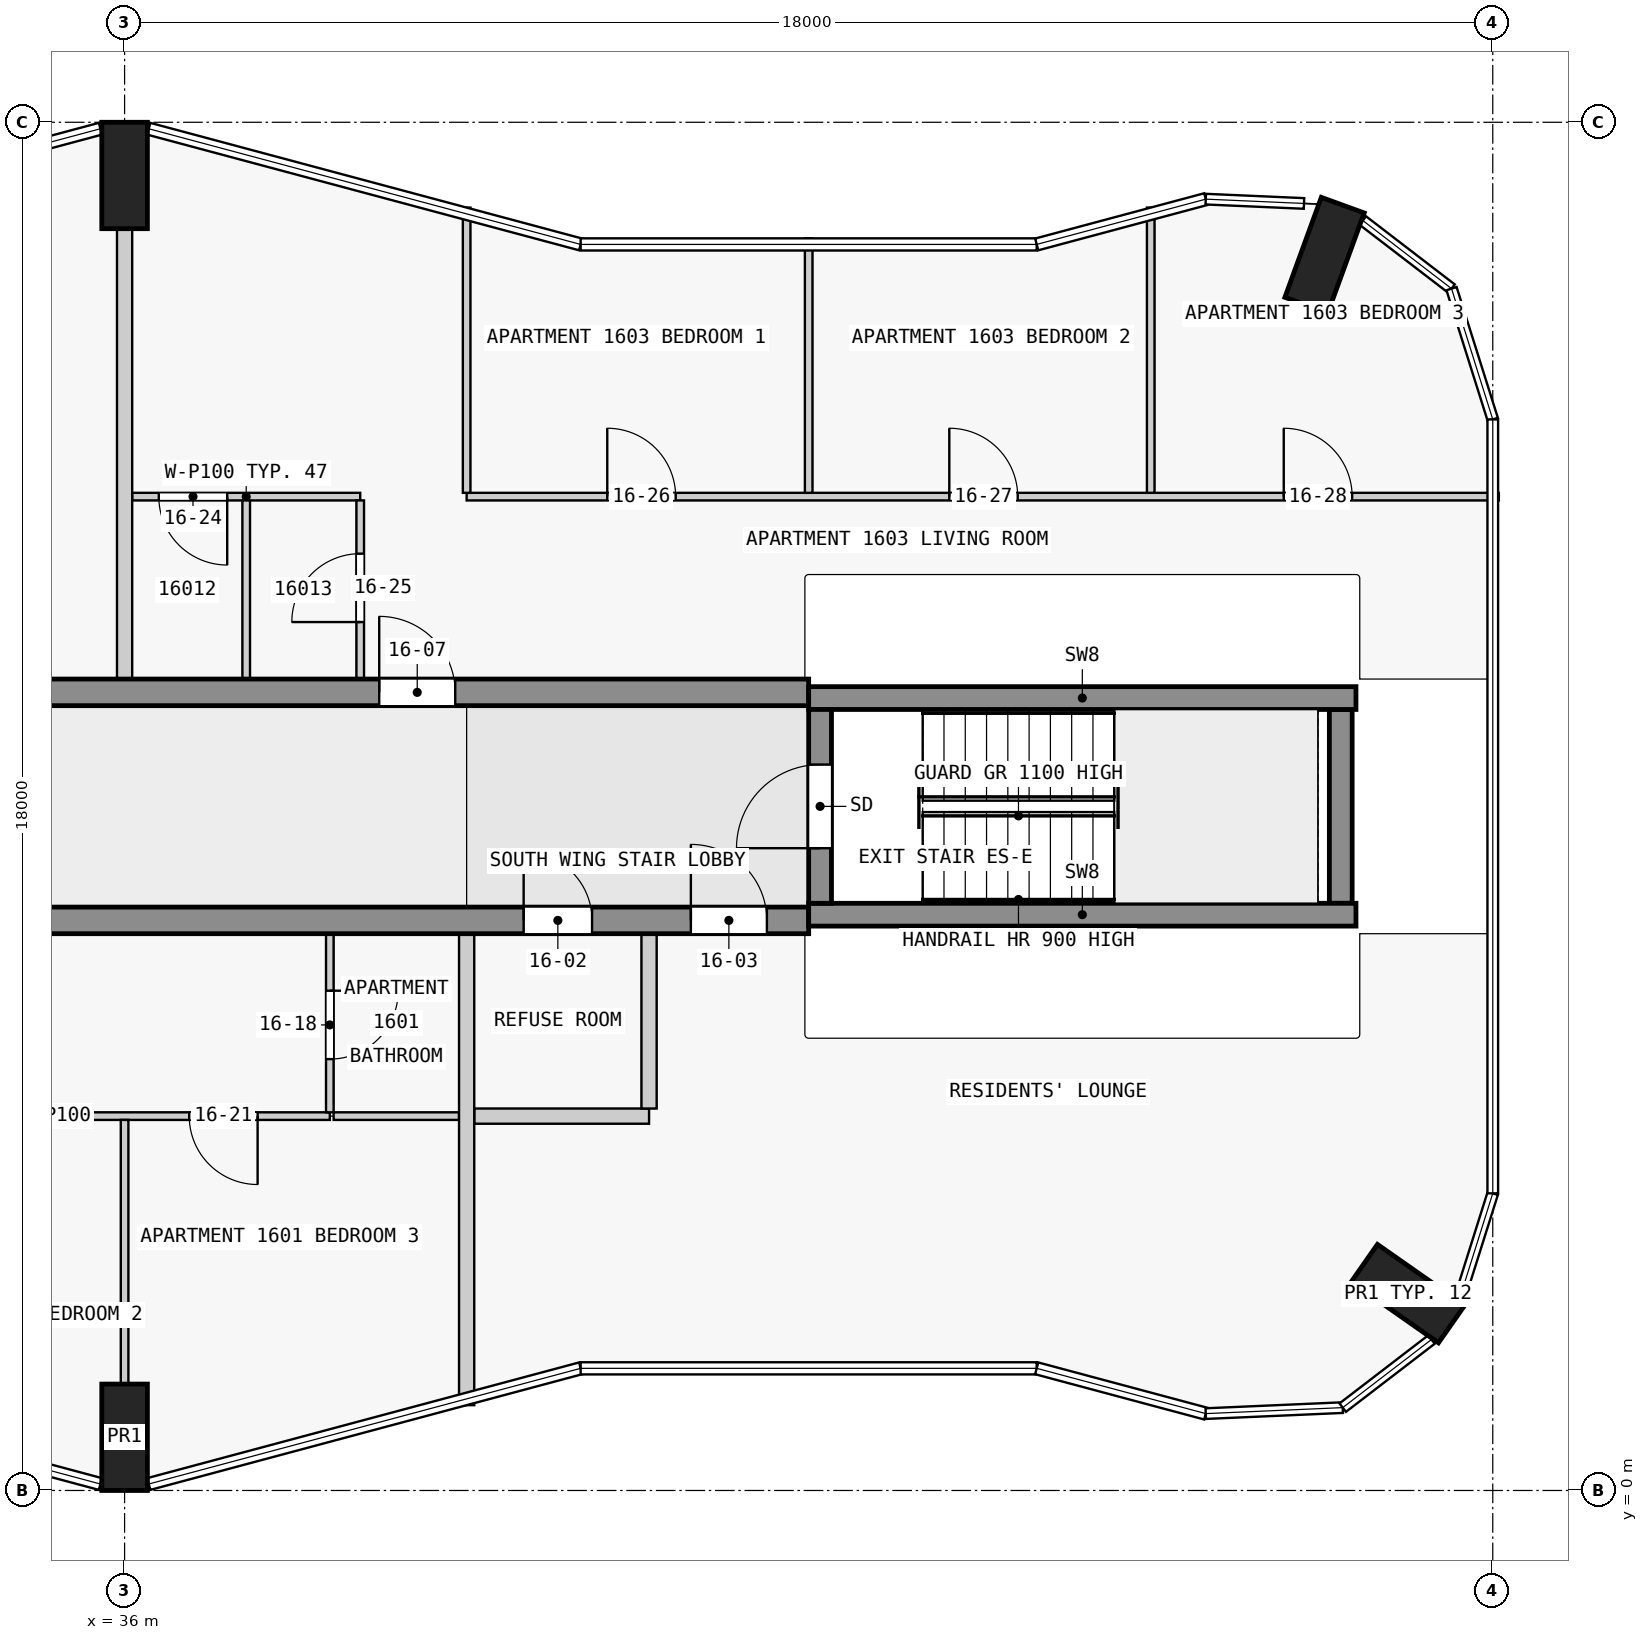
"""IFC4 building model, lengths in metres.
Left out: names, types, materials, properties, quantities, classifications, styles, units other than length and angle.
Written with IfcOpenShell. Run it as: python <this file> out.ifc"""

import sys

from ifc_helpers import new_model, si_unit, direction, frame, frame_2d, origin, origin_2d, place, context, subcontext, project, spatial, rectangle, extrude, element, fill, save


model = new_model("IFC4")
c1 = context("Model", 3, precision=1e-05, world=origin(), true_north=direction((0.0, 1.0)))
c2 = subcontext(c1, "Body", "Model", "MODEL_VIEW")
j1 = project(units=[si_unit("LENGTHUNIT", "METRE"), si_unit("PLANEANGLEUNIT", "RADIAN")], contexts=[c1])
p1 = place(None, origin())
s1 = spatial("IfcSite", under=j1, at=p1, CompositionType="ELEMENT")
p2 = place(p1, origin())
s2 = spatial("IfcBuilding", under=s1, at=p2, CompositionType="ELEMENT")
p3 = place(p2, frame((0.0, 0.0, 65.3)))
s3 = spatial("IfcBuildingStorey", under=s2, at=p3, CompositionType="ELEMENT", Elevation=65.3)
for number, where, z_axis, x_axis in (
    (1, (36.0, 0.7, 0.0), (0.0, 0.0, 1.0), (1.0, 0.0, 0.0)),
    (2, (52.884, 2.59, 0.0), (0.0, 0.0, 1.0), (0.574, 0.819, 0.0)),
    (3, (51.787, 16.252, 0.0), (0.0, 0.0, 1.0), (-0.94, 0.342, 0.0)),
    (4, (36.0, 17.3, 0.0), (0.0, 0.0, 1.0), (1.0, 0.0, 0.0)),
):
    element("IfcColumn", number, at=place(p3, frame(where, z_axis=z_axis, x_axis=x_axis)), inside=s3, PredefinedType="COLUMN", context=c2, shape_type="SweptSolid", body=[
        extrude(rectangle(XDim=0.6, YDim=1.4, at=origin_2d()), origin(), (0.0, 0.0, 1.0), 3.5),
    ])
p4 = place(p3, frame((45.15, 7.725, 0.0), z_axis=(0.0, 0.0, 1.0), x_axis=(0.0, 1.0, 0.0)))
e5 = element("IfcWall", 5, at=p4, inside=s3, PredefinedType="SHEAR", context=c2, shape_type="SweptSolid", body=[
    extrude(rectangle(XDim=2.55, YDim=0.3, at=frame_2d((1.275, 0.0))), origin(), (0.0, 0.0, 1.0), 3.5),
])
p5 = place(p4, frame((0.725, 0.0, 0.0)))
e6 = element("IfcOpeningElement", 6, at=p5, cuts=e5, PredefinedType="OPENING", context=c2, shape_type="SweptSolid", body=[
    extrude(rectangle(XDim=1.1, YDim=2.1, at=frame_2d((0.55, 1.05))), frame((0.0, 0.16, 0.0), z_axis=(0.0, -1.0, 0.0), x_axis=(1.0, 0.0, 0.0)), (0.0, 0.0, 1.0), 0.32),
])
p6 = place(p3, frame((52.0, 7.725, 0.0), z_axis=(0.0, 0.0, 1.0), x_axis=(0.0, 1.0, 0.0)))
e7 = element("IfcWall", 7, at=p6, inside=s3, PredefinedType="SHEAR", context=c2, shape_type="SweptSolid", body=[
    extrude(rectangle(XDim=2.55, YDim=0.3, at=frame_2d((1.275, 0.0))), origin(), (0.0, 0.0, 1.0), 3.5),
])
for number, where, z_axis, x_axis in (
    (8, (45.0, 7.575, 0.0), (0.0, 0.0, 1.0), (1.0, 0.0, 0.0)),
    (9, (45.0, 10.425, 0.0), (0.0, 0.0, 1.0), (1.0, 0.0, 0.0)),
):
    element("IfcWall", number, at=place(p3, frame(where, z_axis=z_axis, x_axis=x_axis)), inside=s3, PredefinedType="SHEAR", context=c2, shape_type="SweptSolid", body=[
        extrude(rectangle(XDim=7.2, YDim=0.3, at=frame_2d((3.6, 0.0))), origin(), (0.0, 0.0, 1.0), 3.5),
    ])
p7 = place(p3, frame((22.5, 7.5, 0.0), z_axis=(0.0, 0.0, 1.0), x_axis=(1.0, 0.0, 0.0)))
e10 = element("IfcWall", 10, at=p7, inside=s3, PredefinedType="SHEAR", context=c2, shape_type="SweptSolid", body=[
    extrude(rectangle(XDim=22.5, YDim=0.35, at=frame_2d((11.25, 0.0))), origin(), (0.0, 0.0, 1.0), 3.25),
])
p8 = place(p7, frame((9.55, 0.0, 0.0)))
e11 = element("IfcOpeningElement", 11, at=p8, cuts=e10, PredefinedType="OPENING", context=c2, shape_type="SweptSolid", body=[
    extrude(rectangle(XDim=1.0, YDim=2.1, at=frame_2d((0.5, 1.05))), frame((0.0, 0.185, 0.0), z_axis=(0.0, -1.0, 0.0), x_axis=(1.0, 0.0, 0.0)), (0.0, 0.0, 1.0), 0.37),
])
p9 = place(p7, frame((18.75, 0.0, 0.0)))
e12 = element("IfcOpeningElement", 12, at=p9, cuts=e10, PredefinedType="OPENING", context=c2, shape_type="SweptSolid", body=[
    extrude(rectangle(XDim=0.9, YDim=2.1, at=frame_2d((0.45, 1.05))), frame((0.0, 0.185, 0.0), z_axis=(0.0, -1.0, 0.0), x_axis=(1.0, 0.0, 0.0)), (0.0, 0.0, 1.0), 0.37),
])
p10 = place(p7, frame((20.95, 0.0, 0.0)))
e13 = element("IfcOpeningElement", 13, at=p10, cuts=e10, PredefinedType="OPENING", context=c2, shape_type="SweptSolid", body=[
    extrude(rectangle(XDim=1.0, YDim=2.1, at=frame_2d((0.5, 1.05))), frame((0.0, 0.185, 0.0), z_axis=(0.0, -1.0, 0.0), x_axis=(1.0, 0.0, 0.0)), (0.0, 0.0, 1.0), 0.37),
])
p11 = place(p3, frame((22.5, 10.5, 0.0), z_axis=(0.0, 0.0, 1.0), x_axis=(1.0, 0.0, 0.0)))
e14 = element("IfcWall", 14, at=p11, inside=s3, PredefinedType="SHEAR", context=c2, shape_type="SweptSolid", body=[
    extrude(rectangle(XDim=22.5, YDim=0.35, at=frame_2d((11.25, 0.0))), origin(), (0.0, 0.0, 1.0), 3.25),
])
p12 = place(p11, frame((1.75, 0.0, 0.0)))
e15 = element("IfcOpeningElement", 15, at=p12, cuts=e14, PredefinedType="OPENING", context=c2, shape_type="SweptSolid", body=[
    extrude(rectangle(XDim=1.0, YDim=2.1, at=frame_2d((0.5, 1.05))), frame((0.0, 0.185, 0.0), z_axis=(0.0, -1.0, 0.0), x_axis=(1.0, 0.0, 0.0)), (0.0, 0.0, 1.0), 0.37),
])
p13 = place(p11, frame((6.25, 0.0, 0.0)))
e16 = element("IfcOpeningElement", 16, at=p13, cuts=e14, PredefinedType="OPENING", context=c2, shape_type="SweptSolid", body=[
    extrude(rectangle(XDim=1.0, YDim=2.1, at=frame_2d((0.5, 1.05))), frame((0.0, 0.185, 0.0), z_axis=(0.0, -1.0, 0.0), x_axis=(1.0, 0.0, 0.0)), (0.0, 0.0, 1.0), 0.37),
])
p14 = place(p11, frame((10.75, 0.0, 0.0)))
e17 = element("IfcOpeningElement", 17, at=p14, cuts=e14, PredefinedType="OPENING", context=c2, shape_type="SweptSolid", body=[
    extrude(rectangle(XDim=1.0, YDim=2.1, at=frame_2d((0.5, 1.05))), frame((0.0, 0.185, 0.0), z_axis=(0.0, -1.0, 0.0), x_axis=(1.0, 0.0, 0.0)), (0.0, 0.0, 1.0), 0.37),
])
p15 = place(p11, frame((16.85, 0.0, 0.0)))
e18 = element("IfcOpeningElement", 18, at=p15, cuts=e14, PredefinedType="OPENING", context=c2, shape_type="SweptSolid", body=[
    extrude(rectangle(XDim=1.0, YDim=2.1, at=frame_2d((0.5, 1.05))), frame((0.0, 0.185, 0.0), z_axis=(0.0, -1.0, 0.0), x_axis=(1.0, 0.0, 0.0)), (0.0, 0.0, 1.0), 0.37),
])
p16 = place(p3, frame((38.7, 4.925, 0.0), z_axis=(0.0, 0.0, 1.0), x_axis=(-1.0, 0.0, 0.0)))
e19 = element("IfcWall", 19, at=p16, inside=s3, PredefinedType="PARTITIONING", context=c2, shape_type="SweptSolid", body=[
    extrude(rectangle(XDim=7.2, YDim=0.1, at=frame_2d((3.6, 0.0))), origin(), (0.0, 0.0, 1.0), 3.25),
])
p17 = place(p16, frame((4.45, 0.0, 0.0)))
e20 = element("IfcOpeningElement", 20, at=p17, cuts=e19, PredefinedType="OPENING", context=c2, shape_type="SweptSolid", body=[
    extrude(rectangle(XDim=0.9, YDim=2.1, at=frame_2d((0.45, 1.05))), frame((0.0, 0.06, 0.0), z_axis=(0.0, -1.0, 0.0), x_axis=(1.0, 0.0, 0.0)), (0.0, 0.0, 1.0), 0.12),
])
p18 = place(p16, frame((0.95, 0.0, 0.0)))
e21 = element("IfcOpeningElement", 21, at=p18, cuts=e19, PredefinedType="OPENING", context=c2, shape_type="SweptSolid", body=[
    extrude(rectangle(XDim=0.9, YDim=2.1, at=frame_2d((0.45, 1.05))), frame((0.0, 0.06, 0.0), z_axis=(0.0, -1.0, 0.0), x_axis=(1.0, 0.0, 0.0)), (0.0, 0.0, 1.0), 0.12),
])
p19 = place(p3, frame((38.75, 4.925, 0.0), z_axis=(0.0, 0.0, 1.0), x_axis=(1.0, 0.0, 0.0)))
e22 = element("IfcWall", 22, at=p19, inside=s3, PredefinedType="PARTITIONING", context=c2, shape_type="SweptSolid", body=[
    extrude(rectangle(XDim=1.65, YDim=0.1, at=frame_2d((0.825, 0.0))), origin(), (0.0, 0.0, 1.0), 3.25),
])
p20 = place(p3, frame((40.6, 4.925, 0.0), z_axis=(0.0, 0.0, 1.0), x_axis=(1.0, 0.0, 0.0)))
e23 = element("IfcWall", 23, at=p20, inside=s3, PredefinedType="PARTITIONING", context=c2, shape_type="SweptSolid", body=[
    extrude(rectangle(XDim=2.3, YDim=0.2, at=frame_2d((1.15, 0.0))), origin(), (0.0, 0.0, 1.0), 3.25),
])
p21 = place(p3, frame((39.1, 13.075, 0.0), z_axis=(0.0, 0.0, 1.0), x_axis=(-1.0, 0.0, 0.0)))
e24 = element("IfcWall", 24, at=p21, inside=s3, PredefinedType="PARTITIONING", context=c2, shape_type="SweptSolid", body=[
    extrude(rectangle(XDim=3.0, YDim=0.1, at=frame_2d((1.5, 0.0))), origin(), (0.0, 0.0, 1.0), 3.25),
])
p22 = place(p21, frame((1.75, 0.0, 0.0)))
e25 = element("IfcOpeningElement", 25, at=p22, cuts=e24, PredefinedType="OPENING", context=c2, shape_type="SweptSolid", body=[
    extrude(rectangle(XDim=0.9, YDim=2.1, at=frame_2d((0.45, 1.05))), frame((0.0, 0.06, 0.0), z_axis=(0.0, -1.0, 0.0), x_axis=(1.0, 0.0, 0.0)), (0.0, 0.0, 1.0), 0.12),
])
p23 = place(p3, frame((40.5, 13.075, 0.0), z_axis=(0.0, 0.0, 1.0), x_axis=(1.0, 0.0, 0.0)))
e26 = element("IfcWall", 26, at=p23, inside=s3, PredefinedType="PARTITIONING", context=c2, shape_type="SweptSolid", body=[
    extrude(rectangle(XDim=13.58, YDim=0.1, at=frame_2d((6.79, 0.0))), origin(), (0.0, 0.0, 1.0), 3.25),
])
p24 = place(p23, frame((1.85, 0.0, 0.0)))
e27 = element("IfcOpeningElement", 27, at=p24, cuts=e26, PredefinedType="OPENING", context=c2, shape_type="SweptSolid", body=[
    extrude(rectangle(XDim=0.9, YDim=2.1, at=frame_2d((0.45, 1.05))), frame((0.0, 0.06, 0.0), z_axis=(0.0, -1.0, 0.0), x_axis=(1.0, 0.0, 0.0)), (0.0, 0.0, 1.0), 0.12),
])
p25 = place(p23, frame((6.35, 0.0, 0.0)))
e28 = element("IfcOpeningElement", 28, at=p25, cuts=e26, PredefinedType="OPENING", context=c2, shape_type="SweptSolid", body=[
    extrude(rectangle(XDim=0.9, YDim=2.1, at=frame_2d((0.45, 1.05))), frame((0.0, 0.06, 0.0), z_axis=(0.0, -1.0, 0.0), x_axis=(1.0, 0.0, 0.0)), (0.0, 0.0, 1.0), 0.12),
])
p26 = place(p23, frame((10.75, 0.0, 0.0)))
e29 = element("IfcOpeningElement", 29, at=p26, cuts=e26, PredefinedType="OPENING", context=c2, shape_type="SweptSolid", body=[
    extrude(rectangle(XDim=0.9, YDim=2.1, at=frame_2d((0.45, 1.05))), frame((0.0, 0.06, 0.0), z_axis=(0.0, -1.0, 0.0), x_axis=(1.0, 0.0, 0.0)), (0.0, 0.0, 1.0), 0.12),
])
p27 = place(p3, frame((36.0, 1.4, 0.0), z_axis=(0.0, 0.0, 1.0), x_axis=(0.0, 1.0, 0.0)))
e30 = element("IfcWall", 30, at=p27, inside=s3, PredefinedType="PARTITIONING", context=c2, shape_type="SweptSolid", body=[
    extrude(rectangle(XDim=3.475, YDim=0.1, at=frame_2d((1.738, 0.0))), origin(), (0.0, 0.0, 1.0), 3.25),
])
p28 = place(p3, frame((36.0, 10.675, 0.0), z_axis=(0.0, 0.0, 1.0), x_axis=(0.0, 1.0, 0.0)))
e31 = element("IfcWall", 31, at=p28, inside=s3, PredefinedType="PARTITIONING", context=c2, shape_type="SweptSolid", body=[
    extrude(rectangle(XDim=5.925, YDim=0.2, at=frame_2d((2.962, 0.0))), origin(), (0.0, 0.0, 1.0), 3.25),
])
p29 = place(p3, frame((37.6, 10.675, 0.0), z_axis=(0.0, 0.0, 1.0), x_axis=(0.0, 1.0, 0.0)))
e32 = element("IfcWall", 32, at=p29, inside=s3, PredefinedType="PARTITIONING", context=c2, shape_type="SweptSolid", body=[
    extrude(rectangle(XDim=2.35, YDim=0.1, at=frame_2d((1.175, 0.0))), origin(), (0.0, 0.0, 1.0), 3.25),
])
p30 = place(p3, frame((38.7, 7.325, 0.0), z_axis=(0.0, 0.0, 1.0), x_axis=(0.0, -1.0, 0.0)))
e33 = element("IfcWall", 33, at=p30, inside=s3, PredefinedType="PARTITIONING", context=c2, shape_type="SweptSolid", body=[
    extrude(rectangle(XDim=2.35, YDim=0.1, at=frame_2d((1.175, 0.0))), origin(), (0.0, 0.0, 1.0), 3.25),
])
p31 = place(p30, frame((0.75, 0.0, 0.0)))
e34 = element("IfcOpeningElement", 34, at=p31, cuts=e33, PredefinedType="OPENING", context=c2, shape_type="SweptSolid", body=[
    extrude(rectangle(XDim=0.9, YDim=2.1, at=frame_2d((0.45, 1.05))), frame((0.0, 0.06, 0.0), z_axis=(0.0, -1.0, 0.0), x_axis=(1.0, 0.0, 0.0)), (0.0, 0.0, 1.0), 0.12),
])
p32 = place(p3, frame((39.1, 10.675, 0.0), z_axis=(0.0, 0.0, 1.0), x_axis=(0.0, 1.0, 0.0)))
e35 = element("IfcWall", 35, at=p32, inside=s3, PredefinedType="PARTITIONING", context=c2, shape_type="SweptSolid", body=[
    extrude(rectangle(XDim=2.35, YDim=0.1, at=frame_2d((1.175, 0.0))), origin(), (0.0, 0.0, 1.0), 3.25),
])
p33 = place(p32, frame((0.75, 0.0, 0.0)))
e36 = element("IfcOpeningElement", 36, at=p33, cuts=e35, PredefinedType="OPENING", context=c2, shape_type="SweptSolid", body=[
    extrude(rectangle(XDim=0.9, YDim=2.1, at=frame_2d((0.45, 1.05))), frame((0.0, 0.06, 0.0), z_axis=(0.0, -1.0, 0.0), x_axis=(1.0, 0.0, 0.0)), (0.0, 0.0, 1.0), 0.12),
])
p34 = place(p3, frame((40.5, 16.878, 0.0), z_axis=(0.0, 0.0, 1.0), x_axis=(0.0, -1.0, 0.0)))
e37 = element("IfcWall", 37, at=p34, inside=s3, PredefinedType="PARTITIONING", context=c2, shape_type="SweptSolid", body=[
    extrude(rectangle(XDim=3.753, YDim=0.1, at=frame_2d((1.876, 0.0))), origin(), (0.0, 0.0, 1.0), 3.25),
])
p35 = place(p3, frame((40.5, 1.122, 0.0), z_axis=(0.0, 0.0, 1.0), x_axis=(0.0, 1.0, 0.0)))
e38 = element("IfcWall", 38, at=p35, inside=s3, PredefinedType="PARTITIONING", context=c2, shape_type="SweptSolid", body=[
    extrude(rectangle(XDim=6.203, YDim=0.2, at=frame_2d((3.101, 0.0))), origin(), (0.0, 0.0, 1.0), 3.25),
])
p36 = place(p3, frame((42.9, 5.025, 0.0), z_axis=(0.0, 0.0, 1.0), x_axis=(0.0, 1.0, 0.0)))
e39 = element("IfcWall", 39, at=p36, inside=s3, PredefinedType="PARTITIONING", context=c2, shape_type="SweptSolid", body=[
    extrude(rectangle(XDim=2.3, YDim=0.2, at=frame_2d((1.15, 0.0))), origin(), (0.0, 0.0, 1.0), 3.25),
])
p37 = place(p3, frame((45.0, 13.125, 0.0), z_axis=(0.0, 0.0, 1.0), x_axis=(0.0, 1.0, 0.0)))
e40 = element("IfcWall", 40, at=p37, inside=s3, PredefinedType="PARTITIONING", context=c2, shape_type="SweptSolid", body=[
    extrude(rectangle(XDim=3.348, YDim=0.1, at=frame_2d((1.674, 0.0))), origin(), (0.0, 0.0, 1.0), 3.25),
])
p38 = place(p3, frame((49.5, 13.125, 0.0), z_axis=(0.0, 0.0, 1.0), x_axis=(0.0, 1.0, 0.0)))
e41 = element("IfcWall", 41, at=p38, inside=s3, PredefinedType="PARTITIONING", context=c2, shape_type="SweptSolid", body=[
    extrude(rectangle(XDim=3.753, YDim=0.1, at=frame_2d((1.876, 0.0))), origin(), (0.0, 0.0, 1.0), 3.25),
])
p39 = place(p5, origin())
e42 = element("IfcDoor", 42, at=p39, inside=s3, OperationType="SINGLE_SWING_LEFT", PredefinedType="DOOR", context=c2, shape_type="SweptSolid", body=[
    extrude(rectangle(XDim=1.1, YDim=2.1, at=frame_2d((0.55, 1.05))), frame((0.0, 0.025, 0.0), z_axis=(0.0, -1.0, 0.0), x_axis=(1.0, 0.0, 0.0)), (0.0, 0.0, 1.0), 0.05),
])
fill(e6, e42)
p40 = place(p9, origin())
e43 = element("IfcDoor", 43, at=p40, inside=s3, OperationType="SINGLE_SWING_RIGHT", PredefinedType="DOOR", context=c2, shape_type="SweptSolid", body=[
    extrude(rectangle(XDim=0.9, YDim=2.1, at=frame_2d((0.45, 1.05))), frame((0.0, 0.025, 0.0), z_axis=(0.0, -1.0, 0.0), x_axis=(1.0, 0.0, 0.0)), (0.0, 0.0, 1.0), 0.05),
])
fill(e12, e43)
p41 = place(p10, origin())
e44 = element("IfcDoor", 44, at=p41, inside=s3, OperationType="SINGLE_SWING_RIGHT", PredefinedType="DOOR", context=c2, shape_type="SweptSolid", body=[
    extrude(rectangle(XDim=1.0, YDim=2.1, at=frame_2d((0.5, 1.05))), frame((0.0, 0.025, 0.0), z_axis=(0.0, -1.0, 0.0), x_axis=(1.0, 0.0, 0.0)), (0.0, 0.0, 1.0), 0.05),
])
fill(e13, e44)
p42 = place(p15, origin())
e45 = element("IfcDoor", 45, at=p42, inside=s3, OperationType="SINGLE_SWING_RIGHT", PredefinedType="DOOR", context=c2, shape_type="SweptSolid", body=[
    extrude(rectangle(XDim=1.0, YDim=2.1, at=frame_2d((0.5, 1.05))), frame((0.0, 0.025, 0.0), z_axis=(0.0, -1.0, 0.0), x_axis=(1.0, 0.0, 0.0)), (0.0, 0.0, 1.0), 0.05),
])
fill(e18, e45)
p43 = place(p31, origin())
e46 = element("IfcDoor", 46, at=p43, inside=s3, OperationType="SINGLE_SWING_RIGHT", PredefinedType="DOOR", context=c2, shape_type="SweptSolid", body=[
    extrude(rectangle(XDim=0.9, YDim=2.1, at=frame_2d((0.45, 1.05))), frame((0.0, 0.025, 0.0), z_axis=(0.0, -1.0, 0.0), x_axis=(1.0, 0.0, 0.0)), (0.0, 0.0, 1.0), 0.05),
])
fill(e34, e46)
p44 = place(p18, origin())
e47 = element("IfcDoor", 47, at=p44, inside=s3, OperationType="SINGLE_SWING_LEFT", PredefinedType="DOOR", context=c2, shape_type="SweptSolid", body=[
    extrude(rectangle(XDim=0.9, YDim=2.1, at=frame_2d((0.45, 1.05))), frame((0.0, 0.025, 0.0), z_axis=(0.0, -1.0, 0.0), x_axis=(1.0, 0.0, 0.0)), (0.0, 0.0, 1.0), 0.05),
])
fill(e21, e47)
p45 = place(p22, origin())
e48 = element("IfcDoor", 48, at=p45, inside=s3, OperationType="SINGLE_SWING_RIGHT", PredefinedType="DOOR", context=c2, shape_type="SweptSolid", body=[
    extrude(rectangle(XDim=0.9, YDim=2.1, at=frame_2d((0.45, 1.05))), frame((0.0, 0.025, 0.0), z_axis=(0.0, -1.0, 0.0), x_axis=(1.0, 0.0, 0.0)), (0.0, 0.0, 1.0), 0.05),
])
fill(e25, e48)
p46 = place(p33, origin())
e49 = element("IfcDoor", 49, at=p46, inside=s3, OperationType="SINGLE_SWING_RIGHT", PredefinedType="DOOR", context=c2, shape_type="SweptSolid", body=[
    extrude(rectangle(XDim=0.9, YDim=2.1, at=frame_2d((0.45, 1.05))), frame((0.0, 0.025, 0.0), z_axis=(0.0, -1.0, 0.0), x_axis=(1.0, 0.0, 0.0)), (0.0, 0.0, 1.0), 0.05),
])
fill(e36, e49)
p47 = place(p24, origin())
e50 = element("IfcDoor", 50, at=p47, inside=s3, OperationType="SINGLE_SWING_LEFT", PredefinedType="DOOR", context=c2, shape_type="SweptSolid", body=[
    extrude(rectangle(XDim=0.9, YDim=2.1, at=frame_2d((0.45, 1.05))), frame((0.0, 0.025, 0.0), z_axis=(0.0, -1.0, 0.0), x_axis=(1.0, 0.0, 0.0)), (0.0, 0.0, 1.0), 0.05),
])
fill(e27, e50)
p48 = place(p25, origin())
e51 = element("IfcDoor", 51, at=p48, inside=s3, OperationType="SINGLE_SWING_RIGHT", PredefinedType="DOOR", context=c2, shape_type="SweptSolid", body=[
    extrude(rectangle(XDim=0.9, YDim=2.1, at=frame_2d((0.45, 1.05))), frame((0.0, 0.025, 0.0), z_axis=(0.0, -1.0, 0.0), x_axis=(1.0, 0.0, 0.0)), (0.0, 0.0, 1.0), 0.05),
])
fill(e28, e51)
p49 = place(p26, origin())
e52 = element("IfcDoor", 52, at=p49, inside=s3, OperationType="SINGLE_SWING_RIGHT", PredefinedType="DOOR", context=c2, shape_type="SweptSolid", body=[
    extrude(rectangle(XDim=0.9, YDim=2.1, at=frame_2d((0.45, 1.05))), frame((0.0, 0.025, 0.0), z_axis=(0.0, -1.0, 0.0), x_axis=(1.0, 0.0, 0.0)), (0.0, 0.0, 1.0), 0.05),
])
fill(e29, e52)
save(model, sys.argv[1])
